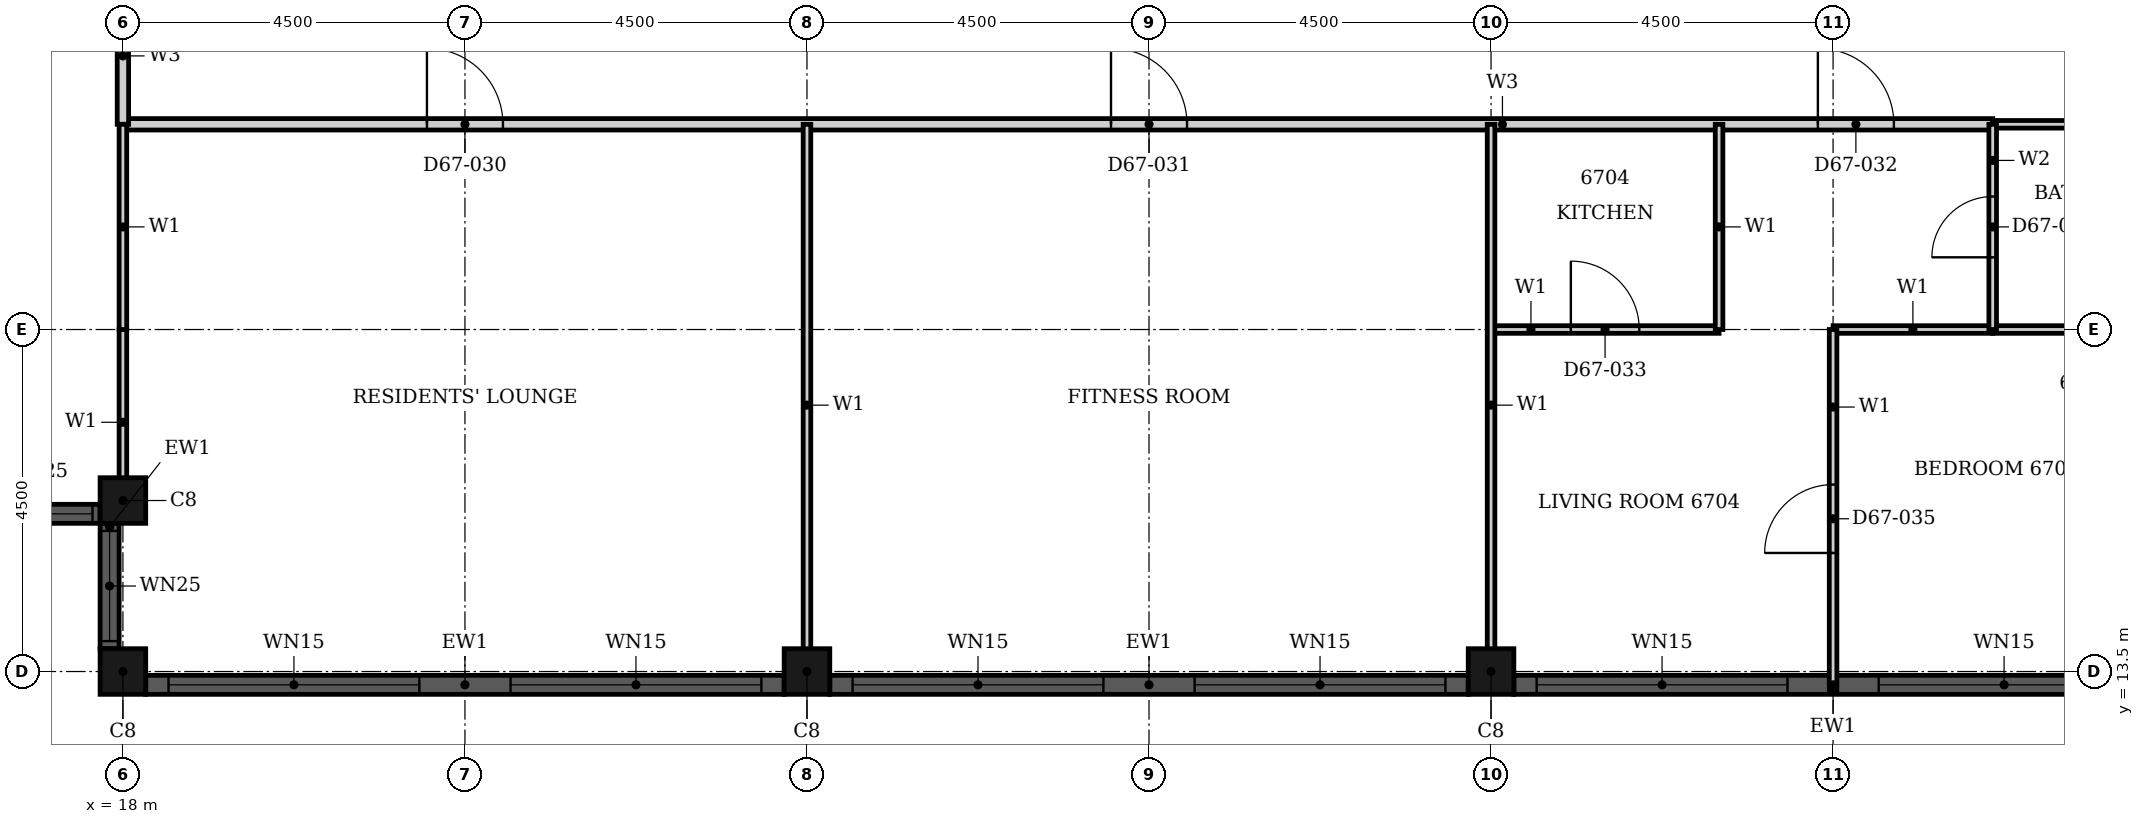
"""IFC4 building model, lengths in metres.
Left out: names, types, materials, properties, quantities, classifications, styles, units other than length and angle.
Written with IfcOpenShell. Run it as: python <this file> out.ifc"""

import sys

from ifc_helpers import new_model, si_unit, direction, frame, frame_2d, origin, origin_2d, place, context, subcontext, project, spatial, rectangle, hollow_rectangle, extrude, element, fill, save


model = new_model("IFC4")
c1 = context("Model", 3, precision=1e-05, world=origin(), true_north=direction((0.0, 1.0)))
c2 = subcontext(c1, "Body", "Model", "MODEL_VIEW")
j1 = project(units=[si_unit("LENGTHUNIT", "METRE"), si_unit("PLANEANGLEUNIT", "RADIAN")], contexts=[c1])
p1 = place(None, origin())
s1 = spatial("IfcSite", under=j1, at=p1, CompositionType="ELEMENT")
p2 = place(p1, origin())
s2 = spatial("IfcBuilding", under=s1, at=p2, CompositionType="ELEMENT")
p3 = place(p2, frame((0.0, 0.0, 263.8)))
s3 = spatial("IfcBuildingStorey", under=s2, at=p3, CompositionType="ELEMENT", Elevation=263.8)
for number, where, z_axis, x_axis in (
    (1, (18.0, 15.75, 0.0), (0.0, 0.0, 1.0), (1.0, 0.0, 0.0)),
    (2, (18.0, 13.5, 0.0), (0.0, 0.0, 1.0), (1.0, 0.0, 0.0)),
    (3, (27.0, 13.5, 0.0), (0.0, 0.0, 1.0), (1.0, 0.0, 0.0)),
    (4, (36.0, 13.5, 0.0), (0.0, 0.0, 1.0), (1.0, 0.0, 0.0)),
):
    element("IfcColumn", number, at=place(p3, frame(where, z_axis=z_axis, x_axis=x_axis)), inside=s3, PredefinedType="COLUMN", context=c2, shape_type="SweptSolid", body=[
        extrude(hollow_rectangle(XDim=0.6, YDim=0.6, WallThickness=0.02, at=origin_2d()), origin(), (0.0, 0.0, 1.0), 3.7),
    ])
p4 = place(p3, frame((16.05, 15.575, 0.0), z_axis=(0.0, 0.0, 1.0), x_axis=(1.0, 0.0, 0.0)))
e5 = element("IfcWall", 5, at=p4, inside=s3, PredefinedType="SOLIDWALL", context=c2, shape_type="SweptSolid", body=[
    extrude(rectangle(XDim=1.65, YDim=0.25, at=frame_2d((0.825, 0.0))), origin(), (0.0, 0.0, 1.0), 3.7),
])
p5 = place(p4, frame((0.1, 0.0, 0.9)))
e6 = element("IfcOpeningElement", 6, at=p5, cuts=e5, PredefinedType="OPENING", context=c2, shape_type="SweptSolid", body=[
    extrude(rectangle(XDim=1.45, YDim=1.85, at=frame_2d((0.725, 0.925))), frame((0.0, 0.135, 0.0), z_axis=(0.0, -1.0, 0.0), x_axis=(1.0, 0.0, 0.0)), (0.0, 0.0, 1.0), 0.27),
])
p6 = place(p3, frame((17.825, 15.45, 0.0), z_axis=(0.0, 0.0, 1.0), x_axis=(0.0, -1.0, 0.0)))
e7 = element("IfcWall", 7, at=p6, inside=s3, PredefinedType="SOLIDWALL", context=c2, shape_type="SweptSolid", body=[
    extrude(rectangle(XDim=1.65, YDim=0.25, at=frame_2d((0.825, 0.0))), origin(), (0.0, 0.0, 1.0), 3.7),
])
p7 = place(p6, frame((0.1, 0.0, 0.9)))
e8 = element("IfcOpeningElement", 8, at=p7, cuts=e7, PredefinedType="OPENING", context=c2, shape_type="SweptSolid", body=[
    extrude(rectangle(XDim=1.45, YDim=1.85, at=frame_2d((0.725, 0.925))), frame((0.0, 0.135, 0.0), z_axis=(0.0, -1.0, 0.0), x_axis=(1.0, 0.0, 0.0)), (0.0, 0.0, 1.0), 0.27),
])
p8 = place(p3, frame((18.3, 13.325, 0.0), z_axis=(0.0, 0.0, 1.0), x_axis=(1.0, 0.0, 0.0)))
e9 = element("IfcWall", 9, at=p8, inside=s3, PredefinedType="SOLIDWALL", context=c2, shape_type="SweptSolid", body=[
    extrude(rectangle(XDim=8.4, YDim=0.25, at=frame_2d((4.2, 0.0))), origin(), (0.0, 0.0, 1.0), 3.7),
])
p9 = place(p8, frame((0.3, 0.0, 0.45)))
e10 = element("IfcOpeningElement", 10, at=p9, cuts=e9, PredefinedType="OPENING", context=c2, shape_type="SweptSolid", body=[
    extrude(rectangle(XDim=3.3, YDim=2.3, at=frame_2d((1.65, 1.15))), frame((0.0, 0.135, 0.0), z_axis=(0.0, -1.0, 0.0), x_axis=(1.0, 0.0, 0.0)), (0.0, 0.0, 1.0), 0.27),
])
p10 = place(p8, frame((4.8, 0.0, 0.45)))
e11 = element("IfcOpeningElement", 11, at=p10, cuts=e9, PredefinedType="OPENING", context=c2, shape_type="SweptSolid", body=[
    extrude(rectangle(XDim=3.3, YDim=2.3, at=frame_2d((1.65, 1.15))), frame((0.0, 0.135, 0.0), z_axis=(0.0, -1.0, 0.0), x_axis=(1.0, 0.0, 0.0)), (0.0, 0.0, 1.0), 0.27),
])
p11 = place(p3, frame((27.3, 13.325, 0.0), z_axis=(0.0, 0.0, 1.0), x_axis=(1.0, 0.0, 0.0)))
e12 = element("IfcWall", 12, at=p11, inside=s3, PredefinedType="SOLIDWALL", context=c2, shape_type="SweptSolid", body=[
    extrude(rectangle(XDim=8.4, YDim=0.25, at=frame_2d((4.2, 0.0))), origin(), (0.0, 0.0, 1.0), 3.7),
])
p12 = place(p11, frame((0.3, 0.0, 0.45)))
e13 = element("IfcOpeningElement", 13, at=p12, cuts=e12, PredefinedType="OPENING", context=c2, shape_type="SweptSolid", body=[
    extrude(rectangle(XDim=3.3, YDim=2.3, at=frame_2d((1.65, 1.15))), frame((0.0, 0.135, 0.0), z_axis=(0.0, -1.0, 0.0), x_axis=(1.0, 0.0, 0.0)), (0.0, 0.0, 1.0), 0.27),
])
p13 = place(p11, frame((4.8, 0.0, 0.45)))
e14 = element("IfcOpeningElement", 14, at=p13, cuts=e12, PredefinedType="OPENING", context=c2, shape_type="SweptSolid", body=[
    extrude(rectangle(XDim=3.3, YDim=2.3, at=frame_2d((1.65, 1.15))), frame((0.0, 0.135, 0.0), z_axis=(0.0, -1.0, 0.0), x_axis=(1.0, 0.0, 0.0)), (0.0, 0.0, 1.0), 0.27),
])
p14 = place(p3, frame((36.3, 13.325, 0.0), z_axis=(0.0, 0.0, 1.0), x_axis=(1.0, 0.0, 0.0)))
e15 = element("IfcWall", 15, at=p14, inside=s3, PredefinedType="SOLIDWALL", context=c2, shape_type="SweptSolid", body=[
    extrude(rectangle(XDim=8.4, YDim=0.25, at=frame_2d((4.2, 0.0))), origin(), (0.0, 0.0, 1.0), 3.7),
])
p15 = place(p14, frame((0.3, 0.0, 0.45)))
e16 = element("IfcOpeningElement", 16, at=p15, cuts=e15, PredefinedType="OPENING", context=c2, shape_type="SweptSolid", body=[
    extrude(rectangle(XDim=3.3, YDim=2.3, at=frame_2d((1.65, 1.15))), frame((0.0, 0.135, 0.0), z_axis=(0.0, -1.0, 0.0), x_axis=(1.0, 0.0, 0.0)), (0.0, 0.0, 1.0), 0.27),
])
p16 = place(p14, frame((4.8, 0.0, 0.45)))
e17 = element("IfcOpeningElement", 17, at=p16, cuts=e15, PredefinedType="OPENING", context=c2, shape_type="SweptSolid", body=[
    extrude(rectangle(XDim=3.3, YDim=2.3, at=frame_2d((1.65, 1.15))), frame((0.0, 0.135, 0.0), z_axis=(0.0, -1.0, 0.0), x_axis=(1.0, 0.0, 0.0)), (0.0, 0.0, 1.0), 0.27),
])
p17 = place(p3, frame((18.0, 20.7, 0.0), z_axis=(0.0, 0.0, 1.0), x_axis=(1.0, 0.0, 0.0)))
e18 = element("IfcWall", 18, at=p17, inside=s3, PredefinedType="PARTITIONING", context=c2, shape_type="SweptSolid", body=[
    extrude(rectangle(XDim=24.6, YDim=0.15, at=frame_2d((12.3, 0.0))), origin(), (0.0, 0.0, 1.0), 3.4),
])
p18 = place(p17, frame((4.0, 0.0, 0.0)))
e19 = element("IfcOpeningElement", 19, at=p18, cuts=e18, PredefinedType="OPENING", context=c2, shape_type="SweptSolid", body=[
    extrude(rectangle(XDim=1.0, YDim=2.1, at=frame_2d((0.5, 1.05))), frame((0.0, 0.085, 0.0), z_axis=(0.0, -1.0, 0.0), x_axis=(1.0, 0.0, 0.0)), (0.0, 0.0, 1.0), 0.17),
])
p19 = place(p17, frame((13.0, 0.0, 0.0)))
e20 = element("IfcOpeningElement", 20, at=p19, cuts=e18, PredefinedType="OPENING", context=c2, shape_type="SweptSolid", body=[
    extrude(rectangle(XDim=1.0, YDim=2.1, at=frame_2d((0.5, 1.05))), frame((0.0, 0.085, 0.0), z_axis=(0.0, -1.0, 0.0), x_axis=(1.0, 0.0, 0.0)), (0.0, 0.0, 1.0), 0.17),
])
p20 = place(p17, frame((22.3, 0.0, 0.0)))
e21 = element("IfcOpeningElement", 21, at=p20, cuts=e18, PredefinedType="OPENING", context=c2, shape_type="SweptSolid", body=[
    extrude(rectangle(XDim=1.0, YDim=2.2, at=frame_2d((0.5, 1.1))), frame((0.0, 0.085, 0.0), z_axis=(0.0, -1.0, 0.0), x_axis=(1.0, 0.0, 0.0)), (0.0, 0.0, 1.0), 0.17),
])
p21 = place(p3, frame((18.0, 20.7, 0.0), z_axis=(0.0, 0.0, 1.0), x_axis=(0.0, 1.0, 0.0)))
e22 = element("IfcWall", 22, at=p21, inside=s3, PredefinedType="PARTITIONING", context=c2, shape_type="SweptSolid", body=[
    extrude(rectangle(XDim=1.8, YDim=0.15, at=frame_2d((0.9, 0.0))), origin(), (0.0, 0.0, 1.0), 3.4),
])
p22 = place(p3, frame((40.5, 18.0, 0.0), z_axis=(0.0, 0.0, 1.0), x_axis=(1.0, 0.0, 0.0)))
e23 = element("IfcWall", 23, at=p22, inside=s3, PredefinedType="PARTITIONING", context=c2, shape_type="SweptSolid", body=[
    extrude(rectangle(XDim=2.1, YDim=0.1, at=frame_2d((1.05, 0.0))), origin(), (0.0, 0.0, 1.0), 3.4),
])
p23 = place(p3, frame((36.0, 18.0, 0.0), z_axis=(0.0, 0.0, 1.0), x_axis=(1.0, 0.0, 0.0)))
e24 = element("IfcWall", 24, at=p23, inside=s3, PredefinedType="PARTITIONING", context=c2, shape_type="SweptSolid", body=[
    extrude(rectangle(XDim=3.0, YDim=0.1, at=frame_2d((1.5, 0.0))), origin(), (0.0, 0.0, 1.0), 3.4),
])
p24 = place(p23, frame((1.05, 0.0, 0.0)))
e25 = element("IfcOpeningElement", 25, at=p24, cuts=e24, PredefinedType="OPENING", context=c2, shape_type="SweptSolid", body=[
    extrude(rectangle(XDim=0.9, YDim=2.1, at=frame_2d((0.45, 1.05))), frame((0.0, 0.06, 0.0), z_axis=(0.0, -1.0, 0.0), x_axis=(1.0, 0.0, 0.0)), (0.0, 0.0, 1.0), 0.12),
])
p25 = place(p3, frame((18.0, 15.56, 0.0), z_axis=(0.0, 0.0, 1.0), x_axis=(0.0, 1.0, 0.0)))
e26 = element("IfcWall", 26, at=p25, inside=s3, PredefinedType="PARTITIONING", context=c2, shape_type="SweptSolid", body=[
    extrude(rectangle(XDim=2.439, YDim=0.1, at=frame_2d((1.219, 0.0))), origin(), (0.0, 0.0, 1.0), 3.4),
])
p26 = place(p3, frame((18.0, 18.0, 0.0), z_axis=(0.0, 0.0, 1.0), x_axis=(0.0, 1.0, 0.0)))
e27 = element("IfcWall", 27, at=p26, inside=s3, PredefinedType="PARTITIONING", context=c2, shape_type="SweptSolid", body=[
    extrude(rectangle(XDim=2.7, YDim=0.1, at=frame_2d((1.35, 0.0))), origin(), (0.0, 0.0, 1.0), 3.4),
])
for number, where, z_axis, x_axis in (
    (28, (27.0, 13.31, 0.0), (0.0, 0.0, 1.0), (0.0, 1.0, 0.0)),
    (29, (36.0, 13.31, 0.0), (0.0, 0.0, 1.0), (0.0, 1.0, 0.0)),
):
    element("IfcWall", number, at=place(p3, frame(where, z_axis=z_axis, x_axis=x_axis)), inside=s3, PredefinedType="PARTITIONING", context=c2, shape_type="SweptSolid", body=[
        extrude(rectangle(XDim=7.39, YDim=0.1, at=frame_2d((3.695, 0.0))), origin(), (0.0, 0.0, 1.0), 3.4),
    ])
p27 = place(p3, frame((39.0, 18.0, 0.0), z_axis=(0.0, 0.0, 1.0), x_axis=(0.0, 1.0, 0.0)))
e30 = element("IfcWall", 30, at=p27, inside=s3, PredefinedType="PARTITIONING", context=c2, shape_type="SweptSolid", body=[
    extrude(rectangle(XDim=2.7, YDim=0.1, at=frame_2d((1.35, 0.0))), origin(), (0.0, 0.0, 1.0), 3.4),
])
p28 = place(p3, frame((40.5, 13.26, 0.0), z_axis=(0.0, 0.0, 1.0), x_axis=(0.0, 1.0, 0.0)))
e31 = element("IfcWall", 31, at=p28, inside=s3, PredefinedType="PARTITIONING", context=c2, shape_type="SweptSolid", body=[
    extrude(rectangle(XDim=4.74, YDim=0.1, at=frame_2d((2.37, 0.0))), origin(), (0.0, 0.0, 1.0), 3.4),
])
p29 = place(p28, frame((1.8, 0.0, 0.0)))
e32 = element("IfcOpeningElement", 32, at=p29, cuts=e31, PredefinedType="OPENING", context=c2, shape_type="SweptSolid", body=[
    extrude(rectangle(XDim=0.9, YDim=2.1, at=frame_2d((0.45, 1.05))), frame((0.0, 0.06, 0.0), z_axis=(0.0, -1.0, 0.0), x_axis=(1.0, 0.0, 0.0)), (0.0, 0.0, 1.0), 0.12),
])
for number, where, z_axis, x_axis in (
    (33, (42.6, 18.0, 0.0), (0.0, 0.0, 1.0), (1.0, 0.0, 0.0)),
    (34, (42.6, 20.7, 0.0), (0.0, 0.0, 1.0), (1.0, 0.0, 0.0)),
):
    element("IfcWall", number, at=place(p3, frame(where, z_axis=z_axis, x_axis=x_axis)), inside=s3, PredefinedType="PARTITIONING", context=c2, shape_type="SweptSolid", body=[
        extrude(rectangle(XDim=2.4, YDim=0.1, at=frame_2d((1.2, 0.0))), origin(), (0.0, 0.0, 1.0), 3.4),
    ])
p30 = place(p3, frame((42.6, 18.0, 0.0), z_axis=(0.0, 0.0, 1.0), x_axis=(0.0, 1.0, 0.0)))
e35 = element("IfcWall", 35, at=p30, inside=s3, PredefinedType="PARTITIONING", context=c2, shape_type="SweptSolid", body=[
    extrude(rectangle(XDim=2.7, YDim=0.1, at=frame_2d((1.35, 0.0))), origin(), (0.0, 0.0, 1.0), 3.4),
])
p31 = place(p30, frame((0.95, 0.0, 0.0)))
e36 = element("IfcOpeningElement", 36, at=p31, cuts=e35, PredefinedType="OPENING", context=c2, shape_type="SweptSolid", body=[
    extrude(rectangle(XDim=0.8, YDim=2.1, at=frame_2d((0.4, 1.05))), frame((0.0, 0.06, 0.0), z_axis=(0.0, -1.0, 0.0), x_axis=(1.0, 0.0, 0.0)), (0.0, 0.0, 1.0), 0.12),
])
p32 = place(p5, origin())
e37 = element("IfcWindow", 37, at=p32, inside=s3, PartitioningType="SINGLE_PANEL", PredefinedType="WINDOW", context=c2, shape_type="SweptSolid", body=[
    extrude(rectangle(XDim=1.45, YDim=1.85, at=frame_2d((0.725, 0.925))), frame((0.0, 0.03, 0.0), z_axis=(0.0, -1.0, 0.0), x_axis=(1.0, 0.0, 0.0)), (0.0, 0.0, 1.0), 0.06),
])
fill(e6, e37)
p33 = place(p7, origin())
e38 = element("IfcWindow", 38, at=p33, inside=s3, PartitioningType="SINGLE_PANEL", PredefinedType="WINDOW", context=c2, shape_type="SweptSolid", body=[
    extrude(rectangle(XDim=1.45, YDim=1.85, at=frame_2d((0.725, 0.925))), frame((0.0, 0.03, 0.0), z_axis=(0.0, -1.0, 0.0), x_axis=(1.0, 0.0, 0.0)), (0.0, 0.0, 1.0), 0.06),
])
fill(e8, e38)
p34 = place(p9, origin())
e39 = element("IfcWindow", 39, at=p34, inside=s3, PartitioningType="SINGLE_PANEL", PredefinedType="WINDOW", context=c2, shape_type="SweptSolid", body=[
    extrude(rectangle(XDim=3.3, YDim=2.3, at=frame_2d((1.65, 1.15))), frame((0.0, 0.03, 0.0), z_axis=(0.0, -1.0, 0.0), x_axis=(1.0, 0.0, 0.0)), (0.0, 0.0, 1.0), 0.06),
])
fill(e10, e39)
p35 = place(p10, origin())
e40 = element("IfcWindow", 40, at=p35, inside=s3, PartitioningType="SINGLE_PANEL", PredefinedType="WINDOW", context=c2, shape_type="SweptSolid", body=[
    extrude(rectangle(XDim=3.3, YDim=2.3, at=frame_2d((1.65, 1.15))), frame((0.0, 0.03, 0.0), z_axis=(0.0, -1.0, 0.0), x_axis=(1.0, 0.0, 0.0)), (0.0, 0.0, 1.0), 0.06),
])
fill(e11, e40)
p36 = place(p12, origin())
e41 = element("IfcWindow", 41, at=p36, inside=s3, PartitioningType="SINGLE_PANEL", PredefinedType="WINDOW", context=c2, shape_type="SweptSolid", body=[
    extrude(rectangle(XDim=3.3, YDim=2.3, at=frame_2d((1.65, 1.15))), frame((0.0, 0.03, 0.0), z_axis=(0.0, -1.0, 0.0), x_axis=(1.0, 0.0, 0.0)), (0.0, 0.0, 1.0), 0.06),
])
fill(e13, e41)
p37 = place(p13, origin())
e42 = element("IfcWindow", 42, at=p37, inside=s3, PartitioningType="SINGLE_PANEL", PredefinedType="WINDOW", context=c2, shape_type="SweptSolid", body=[
    extrude(rectangle(XDim=3.3, YDim=2.3, at=frame_2d((1.65, 1.15))), frame((0.0, 0.03, 0.0), z_axis=(0.0, -1.0, 0.0), x_axis=(1.0, 0.0, 0.0)), (0.0, 0.0, 1.0), 0.06),
])
fill(e14, e42)
p38 = place(p15, origin())
e43 = element("IfcWindow", 43, at=p38, inside=s3, PartitioningType="SINGLE_PANEL", PredefinedType="WINDOW", context=c2, shape_type="SweptSolid", body=[
    extrude(rectangle(XDim=3.3, YDim=2.3, at=frame_2d((1.65, 1.15))), frame((0.0, 0.03, 0.0), z_axis=(0.0, -1.0, 0.0), x_axis=(1.0, 0.0, 0.0)), (0.0, 0.0, 1.0), 0.06),
])
fill(e16, e43)
p39 = place(p16, origin())
e44 = element("IfcWindow", 44, at=p39, inside=s3, PartitioningType="SINGLE_PANEL", PredefinedType="WINDOW", context=c2, shape_type="SweptSolid", body=[
    extrude(rectangle(XDim=3.3, YDim=2.3, at=frame_2d((1.65, 1.15))), frame((0.0, 0.03, 0.0), z_axis=(0.0, -1.0, 0.0), x_axis=(1.0, 0.0, 0.0)), (0.0, 0.0, 1.0), 0.06),
])
fill(e17, e44)
p40 = place(p18, origin())
e45 = element("IfcDoor", 45, at=p40, inside=s3, OperationType="SINGLE_SWING_RIGHT", PredefinedType="DOOR", context=c2, shape_type="SweptSolid", body=[
    extrude(rectangle(XDim=1.0, YDim=2.1, at=frame_2d((0.5, 1.05))), frame((0.0, 0.025, 0.0), z_axis=(0.0, -1.0, 0.0), x_axis=(1.0, 0.0, 0.0)), (0.0, 0.0, 1.0), 0.05),
])
fill(e19, e45)
p41 = place(p19, origin())
e46 = element("IfcDoor", 46, at=p41, inside=s3, OperationType="SINGLE_SWING_RIGHT", PredefinedType="DOOR", context=c2, shape_type="SweptSolid", body=[
    extrude(rectangle(XDim=1.0, YDim=2.1, at=frame_2d((0.5, 1.05))), frame((0.0, 0.025, 0.0), z_axis=(0.0, -1.0, 0.0), x_axis=(1.0, 0.0, 0.0)), (0.0, 0.0, 1.0), 0.05),
])
fill(e20, e46)
p42 = place(p20, origin())
e47 = element("IfcDoor", 47, at=p42, inside=s3, OperationType="SINGLE_SWING_RIGHT", PredefinedType="DOOR", context=c2, shape_type="SweptSolid", body=[
    extrude(rectangle(XDim=1.0, YDim=2.2, at=frame_2d((0.5, 1.1))), frame((0.0, 0.025, 0.0), z_axis=(0.0, -1.0, 0.0), x_axis=(1.0, 0.0, 0.0)), (0.0, 0.0, 1.0), 0.05),
])
fill(e21, e47)
p43 = place(p24, origin())
e48 = element("IfcDoor", 48, at=p43, inside=s3, OperationType="SINGLE_SWING_LEFT", PredefinedType="DOOR", context=c2, shape_type="SweptSolid", body=[
    extrude(rectangle(XDim=0.9, YDim=2.1, at=frame_2d((0.45, 1.05))), frame((0.0, 0.025, 0.0), z_axis=(0.0, -1.0, 0.0), x_axis=(1.0, 0.0, 0.0)), (0.0, 0.0, 1.0), 0.05),
])
fill(e25, e48)
p44 = place(p31, origin())
e49 = element("IfcDoor", 49, at=p44, inside=s3, OperationType="SINGLE_SWING_RIGHT", PredefinedType="DOOR", context=c2, shape_type="SweptSolid", body=[
    extrude(rectangle(XDim=0.8, YDim=2.1, at=frame_2d((0.4, 1.05))), frame((0.0, 0.025, 0.0), z_axis=(0.0, -1.0, 0.0), x_axis=(1.0, 0.0, 0.0)), (0.0, 0.0, 1.0), 0.05),
])
fill(e36, e49)
p45 = place(p29, origin())
e50 = element("IfcDoor", 50, at=p45, inside=s3, OperationType="SINGLE_SWING_RIGHT", PredefinedType="DOOR", context=c2, shape_type="SweptSolid", body=[
    extrude(rectangle(XDim=0.9, YDim=2.1, at=frame_2d((0.45, 1.05))), frame((0.0, 0.025, 0.0), z_axis=(0.0, -1.0, 0.0), x_axis=(1.0, 0.0, 0.0)), (0.0, 0.0, 1.0), 0.05),
])
fill(e32, e50)
save(model, sys.argv[1])
